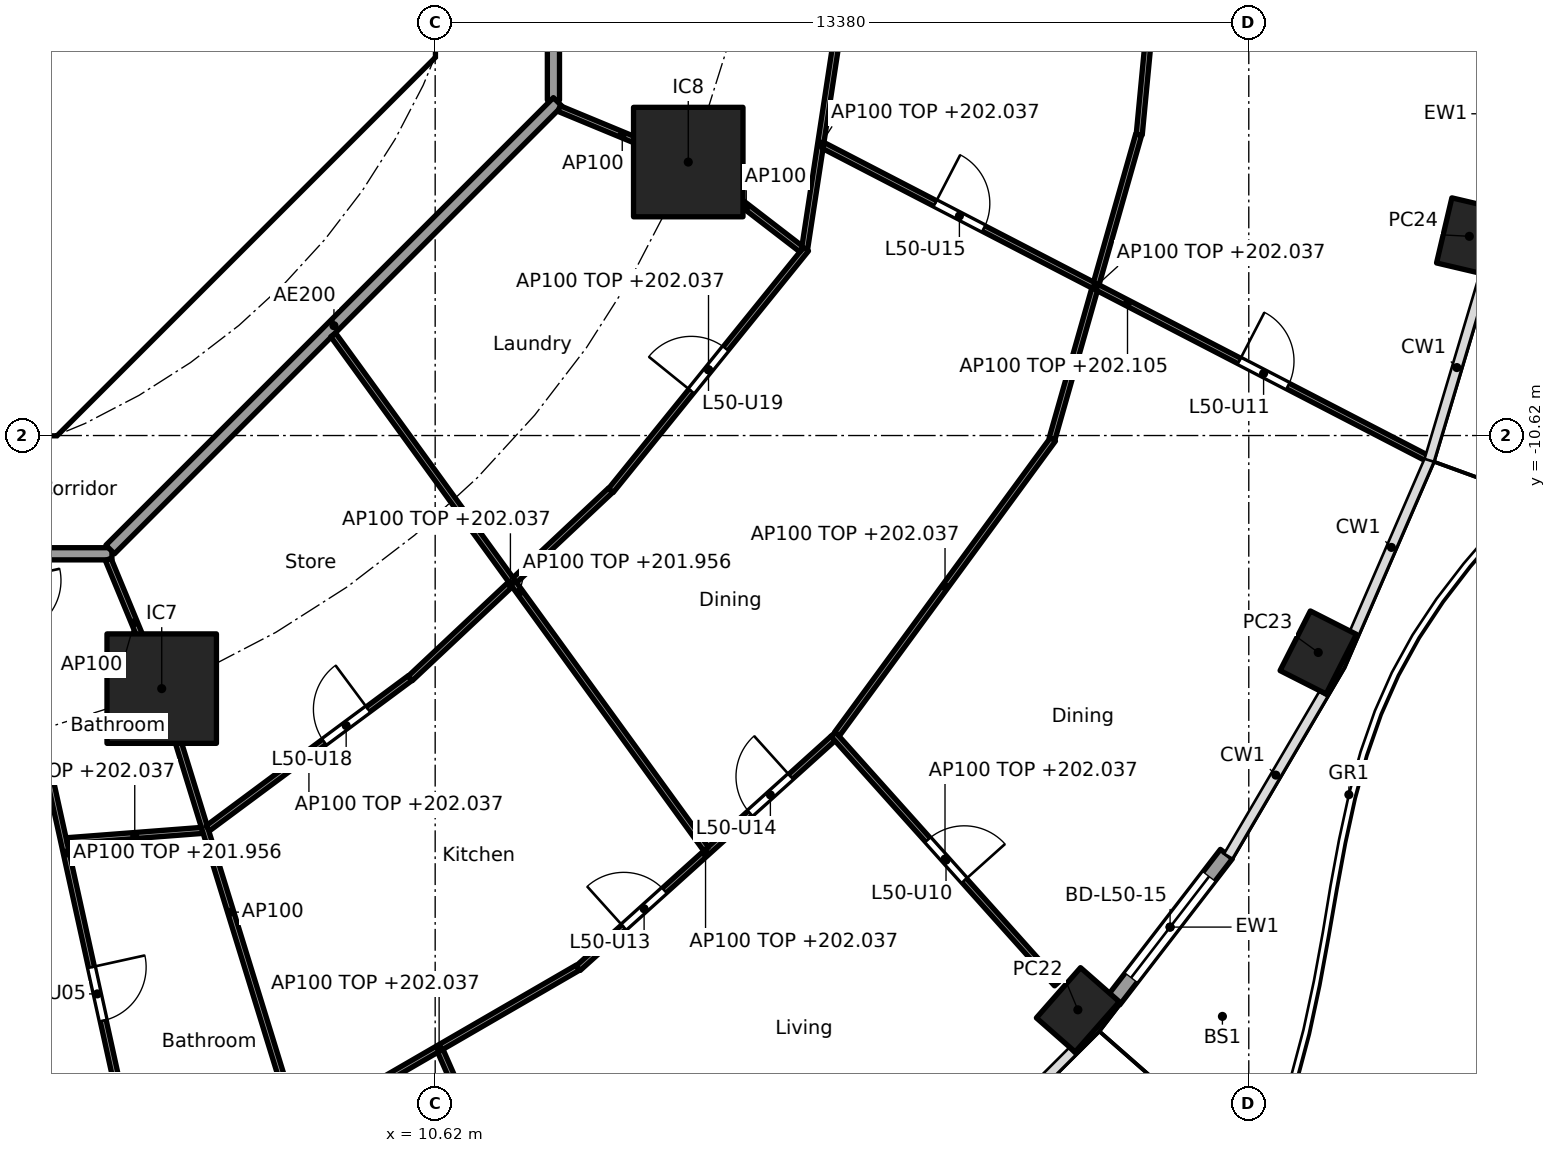
"""IFC4 building model, lengths in metres.
Left out: names, types, materials, properties, quantities, classifications, styles, units other than length and angle.
Written with IfcOpenShell. Run it as: python <this file> out.ifc"""

import sys

from ifc_helpers import new_model, si_unit, direction, frame, frame_2d, origin, origin_2d, place, context, subcontext, project, spatial, polyline, rectangle, hollow_rectangle, outline, extrude, element, fill, save


model = new_model("IFC4")
c1 = context("Model", 3, precision=1e-05, world=origin(), true_north=direction((0.0, 1.0)))
c2 = subcontext(c1, "Body", "Model", "MODEL_VIEW")
j1 = project(units=[si_unit("LENGTHUNIT", "METRE"), si_unit("PLANEANGLEUNIT", "RADIAN")], contexts=[c1])
p1 = place(None, origin())
s1 = spatial("IfcSite", under=j1, at=p1, CompositionType="ELEMENT")
p2 = place(p1, origin())
s2 = spatial("IfcBuilding", under=s1, at=p2, CompositionType="ELEMENT")
p3 = place(p2, frame((0.0, 0.0, 199.2)))
s3 = spatial("IfcBuildingStorey", under=s2, at=p3, CompositionType="ELEMENT", Elevation=199.2)
for number, where, z_axis, x_axis in (
    (1, (21.189, -20.064, 0.0), (0.0, 0.0, 1.0), (0.66, 0.751, 0.0)),
    (2, (25.142, -14.188, 0.0), (0.0, 0.0, 1.0), (0.452, 0.892, 0.0)),
    (3, (27.627, -7.344, 0.0), (0.0, 0.0, 1.0), (0.229, 0.973, 0.0)),
):
    element("IfcColumn", number, at=place(p3, frame(where, z_axis=z_axis, x_axis=x_axis)), inside=s3, PredefinedType="COLUMN", context=c2, shape_type="SweptSolid", body=[
        extrude(hollow_rectangle(XDim=1.1, YDim=0.85, WallThickness=0.036, at=origin_2d()), origin(), (0.0, 0.0, 1.0), 3.7),
    ])
for number, where, z_axis, x_axis in (
    (4, (6.123, -14.782, 0.0), (0.0, 0.0, 1.0), (1.0, 0.0, 0.0)),
    (5, (14.782, -6.123, 0.0), (0.0, 0.0, 1.0), (1.0, 0.0, 0.0)),
):
    element("IfcColumn", number, at=place(p3, frame(where, z_axis=z_axis, x_axis=x_axis)), inside=s3, PredefinedType="COLUMN", context=c2, shape_type="SweptSolid", body=[
        extrude(rectangle(XDim=1.8, YDim=1.8, at=origin_2d()), origin(), (0.0, 0.0, 1.0), 3.7),
    ])
p4 = place(p3, frame((23.632, -17.502, 0.0), z_axis=(0.0, 0.0, 1.0), x_axis=(-0.610437428894, -0.79206448311, 0.0)))
e6 = element("IfcWall", 6, at=p4, inside=s3, PredefinedType="SOLIDWALL", context=c2, shape_type="SweptSolid", body=[
    extrude(rectangle(XDim=3.035, YDim=0.25, at=frame_2d((1.518, 0.0))), origin(), (0.0, 0.0, 1.0), 3.44),
])
p5 = place(p4, frame((0.468, 0.0, 0.0)))
e7 = element("IfcOpeningElement", 7, at=p5, cuts=e6, PredefinedType="OPENING", context=c2, shape_type="SweptSolid", body=[
    extrude(rectangle(XDim=2.1, YDim=2.4, at=frame_2d((1.05, 1.2))), frame((0.0, 0.135, 0.0), z_axis=(0.0, -1.0, 0.0), x_axis=(1.0, 0.0, 0.0)), (0.0, 0.0, 1.0), 0.27),
])
p6 = place(p3, frame((4.613, -9.988, 0.0), z_axis=(0.0, 0.0, 1.0), x_axis=(0.707106781187, 0.707106781187, 0.0)))
e8 = element("IfcWall", 8, at=p6, inside=s3, PredefinedType="SHEAR", context=c2, shape_type="SweptSolid", body=[
    extrude(rectangle(XDim=7.602, YDim=0.6, at=frame_2d((3.801, 0.0))), origin(), (0.0, 0.0, 1.0), 3.44),
])
p7 = place(p6, frame((3.201, 0.0, 0.0)))
e9 = element("IfcOpeningElement", 9, at=p7, cuts=e8, PredefinedType="OPENING", context=c2, shape_type="SweptSolid", body=[
    extrude(rectangle(XDim=1.2, YDim=2.1, at=frame_2d((0.6, 1.05))), frame((0.0, 0.31, 0.0), z_axis=(0.0, -1.0, 0.0), x_axis=(1.0, 0.0, 0.0)), (0.0, 0.0, 1.0), 0.62),
])
p8 = place(p3, origin())
e10 = element("IfcWall", 10, at=p8, inside=s3, PredefinedType="SHEAR", context=c2, shape_type="SweptSolid", body=[
    extrude(outline(polyline([(-4.152, -10.025), (4.152, -10.025), (4.401, -9.776), (4.825, -10.2), (4.401, -10.625), (-4.401, -10.625), (-4.825, -10.2), (-4.401, -9.776), (-4.152, -10.025)])), origin(), (0.0, 0.0, 1.0), 3.44),
])
p9 = place(p3, origin())
e11 = element("IfcWall", 11, at=p9, inside=s3, PredefinedType="SHEAR", context=c2, shape_type="SweptSolid", body=[
    extrude(outline(polyline([(9.776, -4.401), (10.025, -4.152), (10.025, -3.801), (10.025, 4.152), (9.776, 4.401), (10.2, 4.825), (10.625, 4.401), (10.625, -4.401), (10.2, -4.825), (9.776, -4.401)])), origin(), (0.0, 0.0, 1.0), 3.44),
])
p10 = place(p3, frame((12.565, -5.104, 0.0), z_axis=(0.0, 0.0, 1.0), x_axis=(0.0, 1.0, 0.0)))
e12 = element("IfcWall", 12, at=p10, inside=s3, PredefinedType="PARTITIONING", context=c2, shape_type="SweptSolid", body=[
    extrude(rectangle(XDim=10.209, YDim=0.2, at=frame_2d((5.104, 0.0))), origin(), (0.0, 0.0, 1.0), 3.44),
])
p11 = place(p3, frame((-5.104, -12.565, 0.0), z_axis=(0.0, 0.0, 1.0), x_axis=(1.0, 0.0, 0.0)))
e13 = element("IfcWall", 13, at=p11, inside=s3, PredefinedType="PARTITIONING", context=c2, shape_type="SweptSolid", body=[
    extrude(rectangle(XDim=10.409, YDim=0.2, at=frame_2d((5.205, 0.0))), origin(), (0.0, 0.0, 1.0), 3.44),
])
p12 = place(p11, frame((6.339, 0.0, 0.0)))
e14 = element("IfcOpeningElement", 14, at=p12, cuts=e13, PredefinedType="OPENING", context=c2, shape_type="SweptSolid", body=[
    extrude(rectangle(XDim=1.0, YDim=2.1, at=frame_2d((0.5, 1.05))), frame((0.0, 0.11, 0.0), z_axis=(0.0, -1.0, 0.0), x_axis=(1.0, 0.0, 0.0)), (0.0, 0.0, 1.0), 0.22),
])
p13 = place(p3, frame((5.275, -12.494, 0.0), z_axis=(0.0, 0.0, 1.0), x_axis=(0.707106781187, 0.707106781187, 0.0)))
e15 = element("IfcWall", 15, at=p13, inside=s3, PredefinedType="PARTITIONING", context=c2, shape_type="SweptSolid", body=[
    extrude(rectangle(XDim=10.409, YDim=0.2, at=frame_2d((5.205, 0.0))), origin(), (0.0, 0.0, 1.0), 3.44),
])
p14 = place(p3, frame((22.734, -0.05, 0.0), z_axis=(0.0, 0.0, 1.0), x_axis=(-0.0949274088, -0.995484197292, 0.0)))
e16 = element("IfcWall", 16, at=p14, inside=s3, PredefinedType="PARTITIONING", context=c2, shape_type="SweptSolid", body=[
    extrude(rectangle(XDim=5.648, YDim=0.1, at=frame_2d((2.824, 0.0))), origin(), (0.0, 0.0, 1.0), 2.837),
])
p15 = place(p3, frame((3.491, -12.662, 0.0), z_axis=(0.0, 0.0, 1.0), x_axis=(0.215082442833, -0.976595895335, 0.0)))
e17 = element("IfcWall", 17, at=p15, inside=s3, PredefinedType="PARTITIONING", context=c2, shape_type="SweptSolid", body=[
    extrude(rectangle(XDim=9.878, YDim=0.1, at=frame_2d((4.939, 0.0))), origin(), (0.0, 0.0, 1.0), 2.756),
])
p16 = place(p15, frame((0.35, 0.0, 0.0)))
e18 = element("IfcOpeningElement", 18, at=p16, cuts=e17, PredefinedType="OPENING", context=c2, shape_type="SweptSolid", body=[
    extrude(rectangle(XDim=0.9, YDim=2.1, at=frame_2d((0.45, 1.05))), frame((0.0, 0.06, 0.0), z_axis=(0.0, -1.0, 0.0), x_axis=(1.0, 0.0, 0.0)), (0.0, 0.0, 1.0), 0.12),
])
p17 = place(p15, frame((6.861, 0.0, 0.0)))
e19 = element("IfcOpeningElement", 19, at=p17, cuts=e17, PredefinedType="OPENING", context=c2, shape_type="SweptSolid", body=[
    extrude(rectangle(XDim=0.9, YDim=2.1, at=frame_2d((0.45, 1.05))), frame((0.0, 0.06, 0.0), z_axis=(0.0, -1.0, 0.0), x_axis=(1.0, 0.0, 0.0)), (0.0, 0.0, 1.0), 0.12),
])
p18 = place(p3, frame((4.568, -17.284, 0.0), z_axis=(0.0, 0.0, 1.0), x_axis=(0.997076339393, 0.076411867029, 0.0)))
e20 = element("IfcWall", 20, at=p18, inside=s3, PredefinedType="PARTITIONING", context=c2, shape_type="SweptSolid", body=[
    extrude(rectangle(XDim=2.23, YDim=0.1, at=frame_2d((1.115, 0.0))), origin(), (0.0, 0.0, 1.0), 2.837),
])
p19 = place(p3, frame((5.243, -12.657, 0.0), z_axis=(0.0, 0.0, 1.0), x_axis=(0.382719158442, -0.923864733477, 0.0)))
e21 = element("IfcWall", 21, at=p19, inside=s3, PredefinedType="PARTITIONING", context=c2, shape_type="SweptSolid", body=[
    extrude(rectangle(XDim=2.25, YDim=0.1, at=frame_2d((1.125, 0.0))), origin(), (0.0, 0.0, 1.0), 3.44),
])
p20 = place(p3, frame((6.138, -14.83, 0.0), z_axis=(0.0, 0.0, 1.0), x_axis=(0.294822274121, -0.955552105687, 0.0)))
e22 = element("IfcWall", 22, at=p20, inside=s3, PredefinedType="PARTITIONING", context=c2, shape_type="SweptSolid", body=[
    extrude(rectangle(XDim=7.594, YDim=0.1, at=frame_2d((3.797, 0.0))), origin(), (0.0, 0.0, 1.0), 3.44),
])
p21 = place(p3, frame((6.881, -17.08, 0.0), z_axis=(0.0, 0.0, 1.0), x_axis=(0.802784956441, 0.596268659005, 0.0)))
e23 = element("IfcWall", 23, at=p21, inside=s3, PredefinedType="PARTITIONING", context=c2, shape_type="SweptSolid", body=[
    extrude(rectangle(XDim=4.142, YDim=0.1, at=frame_2d((2.071, 0.0))), origin(), (0.0, 0.0, 1.0), 2.837),
])
p22 = place(p21, frame((2.384, 0.0, 0.0)))
e24 = element("IfcOpeningElement", 24, at=p22, cuts=e23, PredefinedType="OPENING", context=c2, shape_type="SweptSolid", body=[
    extrude(rectangle(XDim=0.9, YDim=2.1, at=frame_2d((0.45, 1.05))), frame((0.0, 0.06, 0.0), z_axis=(0.0, -1.0, 0.0), x_axis=(1.0, 0.0, 0.0)), (0.0, 0.0, 1.0), 0.12),
])
p23 = place(p3, frame((8.405, -22.013, 0.0), z_axis=(0.0, 0.0, 1.0), x_axis=(0.865277177388, 0.501293732547, 0.0)))
e25 = element("IfcWall", 25, at=p23, inside=s3, PredefinedType="PARTITIONING", context=c2, shape_type="SweptSolid", body=[
    extrude(rectangle(XDim=5.27, YDim=0.1, at=frame_2d((2.635, 0.0))), origin(), (0.0, 0.0, 1.0), 2.837),
])
p24 = place(p3, frame((10.705, -20.738, 0.0), z_axis=(0.0, 0.0, 1.0), x_axis=(0.401740633891, -0.915753494714, 0.0)))
e26 = element("IfcWall", 26, at=p24, inside=s3, PredefinedType="PARTITIONING", context=c2, shape_type="SweptSolid", body=[
    extrude(rectangle(XDim=6.445, YDim=0.1, at=frame_2d((3.223, 0.0))), origin(), (0.0, 0.0, 1.0), 2.905),
])
p25 = place(p24, frame((2.773, 0.0, 0.0)))
e27 = element("IfcOpeningElement", 27, at=p25, cuts=e26, PredefinedType="OPENING", context=c2, shape_type="SweptSolid", body=[
    extrude(rectangle(XDim=0.9, YDim=2.1, at=frame_2d((0.45, 1.05))), frame((0.0, 0.06, 0.0), z_axis=(0.0, -1.0, 0.0), x_axis=(1.0, 0.0, 0.0)), (0.0, 0.0, 1.0), 0.12),
])
p26 = place(p3, frame((10.21, -14.614, 0.0), z_axis=(0.0, 0.0, 1.0), x_axis=(0.728883199496, 0.684638066055, 0.0)))
e28 = element("IfcWall", 28, at=p26, inside=s3, PredefinedType="PARTITIONING", context=c2, shape_type="SweptSolid", body=[
    extrude(rectangle(XDim=4.519, YDim=0.1, at=frame_2d((2.26, 0.0))), origin(), (0.0, 0.0, 1.0), 2.837),
])
p27 = place(p3, frame((12.971, -19.38, 0.0), z_axis=(0.0, 0.0, 1.0), x_axis=(0.742768881471, 0.669547898748, 0.0)))
e29 = element("IfcWall", 29, at=p27, inside=s3, PredefinedType="PARTITIONING", context=c2, shape_type="SweptSolid", body=[
    extrude(rectangle(XDim=5.642, YDim=0.1, at=frame_2d((2.821, 0.0))), origin(), (0.0, 0.0, 1.0), 2.837),
])
p28 = place(p27, frame((1.01, 0.0, 0.0)))
e30 = element("IfcOpeningElement", 30, at=p28, cuts=e29, PredefinedType="OPENING", context=c2, shape_type="SweptSolid", body=[
    extrude(rectangle(XDim=0.9, YDim=2.1, at=frame_2d((0.45, 1.05))), frame((0.0, 0.06, 0.0), z_axis=(0.0, -1.0, 0.0), x_axis=(1.0, 0.0, 0.0)), (0.0, 0.0, 1.0), 0.12),
])
p29 = place(p27, frame((3.806, 0.0, 0.0)))
e31 = element("IfcOpeningElement", 31, at=p29, cuts=e29, PredefinedType="OPENING", context=c2, shape_type="SweptSolid", body=[
    extrude(rectangle(XDim=0.9, YDim=2.1, at=frame_2d((0.45, 1.05))), frame((0.0, 0.06, 0.0), z_axis=(0.0, -1.0, 0.0), x_axis=(1.0, 0.0, 0.0)), (0.0, 0.0, 1.0), 0.12),
])
p30 = place(p3, frame((8.943, -8.966, 0.0), z_axis=(0.0, 0.0, 1.0), x_axis=(0.587181355751, -0.809455406714, 0.0)))
e32 = element("IfcWall", 32, at=p30, inside=s3, PredefinedType="PARTITIONING", context=c2, shape_type="SweptSolid", body=[
    extrude(rectangle(XDim=10.441, YDim=0.1, at=frame_2d((5.221, 0.0))), origin(), (0.0, 0.0, 1.0), 2.756),
])
p31 = place(p3, frame((13.509, -11.525, 0.0), z_axis=(0.0, 0.0, 1.0), x_axis=(0.628778729481, 0.777584277974, 0.0)))
e33 = element("IfcWall", 33, at=p31, inside=s3, PredefinedType="PARTITIONING", context=c2, shape_type="SweptSolid", body=[
    extrude(rectangle(XDim=5.107, YDim=0.1, at=frame_2d((2.554, 0.0))), origin(), (0.0, 0.0, 1.0), 2.837),
])
p32 = place(p31, frame((2.104, 0.0, 0.0)))
e34 = element("IfcOpeningElement", 34, at=p32, cuts=e33, PredefinedType="OPENING", context=c2, shape_type="SweptSolid", body=[
    extrude(rectangle(XDim=0.9, YDim=2.1, at=frame_2d((0.45, 1.05))), frame((0.0, 0.06, 0.0), z_axis=(0.0, -1.0, 0.0), x_axis=(1.0, 0.0, 0.0)), (0.0, 0.0, 1.0), 0.12),
])
p33 = place(p3, frame((17.166, -15.532, 0.0), z_axis=(0.0, 0.0, 1.0), x_axis=(0.66728415915, -0.744803229684, 0.0)))
e35 = element("IfcWall", 35, at=p33, inside=s3, PredefinedType="PARTITIONING", context=c2, shape_type="SweptSolid", body=[
    extrude(rectangle(XDim=5.511, YDim=0.1, at=frame_2d((2.756, 0.0))), origin(), (0.0, 0.0, 1.0), 2.837),
])
p34 = place(p33, frame((2.331, 0.0, 0.0)))
e36 = element("IfcOpeningElement", 36, at=p34, cuts=e35, PredefinedType="OPENING", context=c2, shape_type="SweptSolid", body=[
    extrude(rectangle(XDim=0.9, YDim=2.1, at=frame_2d((0.45, 1.05))), frame((0.0, 0.06, 0.0), z_axis=(0.0, -1.0, 0.0), x_axis=(1.0, 0.0, 0.0)), (0.0, 0.0, 1.0), 0.12),
])
p35 = place(p3, frame((17.229, -15.529, 0.0), z_axis=(0.0, 0.0, 1.0), x_axis=(0.591117075283, 0.806585769345, 0.0)))
e37 = element("IfcWall", 37, at=p35, inside=s3, PredefinedType="PARTITIONING", context=c2, shape_type="SweptSolid", body=[
    extrude(rectangle(XDim=6.01, YDim=0.1, at=frame_2d((3.005, 0.0))), origin(), (0.0, 0.0, 1.0), 2.837),
])
p36 = place(p3, frame((12.657, -5.243, 0.0), z_axis=(0.0, 0.0, 1.0), x_axis=(0.923826362943, -0.382811769845, 0.0)))
e38 = element("IfcWall", 38, at=p36, inside=s3, PredefinedType="PARTITIONING", context=c2, shape_type="SweptSolid", body=[
    extrude(rectangle(XDim=2.25, YDim=0.1, at=frame_2d((1.125, 0.0))), origin(), (0.0, 0.0, 1.0), 3.44),
])
p37 = place(p3, frame((14.822, -6.154, 0.0), z_axis=(0.0, 0.0, 1.0), x_axis=(0.792226528082, -0.610227111987, 0.0)))
e39 = element("IfcWall", 39, at=p37, inside=s3, PredefinedType="PARTITIONING", context=c2, shape_type="SweptSolid", body=[
    extrude(rectangle(XDim=2.307, YDim=0.1, at=frame_2d((1.154, 0.0))), origin(), (0.0, 0.0, 1.0), 3.44),
])
p38 = place(p3, frame((16.697, -7.543, 0.0), z_axis=(0.0, 0.0, 1.0), x_axis=(0.151078880423, 0.988521710379, 0.0)))
e40 = element("IfcWall", 40, at=p38, inside=s3, PredefinedType="PARTITIONING", context=c2, shape_type="SweptSolid", body=[
    extrude(rectangle(XDim=3.469, YDim=0.1, at=frame_2d((1.735, 0.0))), origin(), (0.0, 0.0, 1.0), 2.837),
])
p39 = place(p3, frame((20.765, -10.673, 0.0), z_axis=(0.0, 0.0, 1.0), x_axis=(0.273815967041, 0.961782104322, 0.0)))
e41 = element("IfcWall", 41, at=p39, inside=s3, PredefinedType="PARTITIONING", context=c2, shape_type="SweptSolid", body=[
    extrude(rectangle(XDim=5.202, YDim=0.1, at=frame_2d((2.601, 0.0))), origin(), (0.0, 0.0, 1.0), 2.837),
])
p40 = place(p3, frame((17.003, -5.851, 0.0), z_axis=(0.0, 0.0, 1.0), x_axis=(0.888005628038, -0.4598325832, 0.0)))
e42 = element("IfcWall", 42, at=p40, inside=s3, PredefinedType="PARTITIONING", context=c2, shape_type="SweptSolid", body=[
    extrude(rectangle(XDim=11.266, YDim=0.1, at=frame_2d((5.633, 0.0))), origin(), (0.0, 0.0, 1.0), 2.905),
])
p41 = place(p40, frame((7.703, 0.0, 0.0)))
e43 = element("IfcOpeningElement", 43, at=p41, cuts=e42, PredefinedType="OPENING", context=c2, shape_type="SweptSolid", body=[
    extrude(rectangle(XDim=0.9, YDim=2.1, at=frame_2d((0.45, 1.05))), frame((0.0, 0.06, 0.0), z_axis=(0.0, -1.0, 0.0), x_axis=(1.0, 0.0, 0.0)), (0.0, 0.0, 1.0), 0.12),
])
p42 = place(p40, frame((2.07, 0.0, 0.0)))
e44 = element("IfcOpeningElement", 44, at=p42, cuts=e42, PredefinedType="OPENING", context=c2, shape_type="SweptSolid", body=[
    extrude(rectangle(XDim=0.9, YDim=2.1, at=frame_2d((0.45, 1.05))), frame((0.0, 0.06, 0.0), z_axis=(0.0, -1.0, 0.0), x_axis=(1.0, 0.0, 0.0)), (0.0, 0.0, 1.0), 0.12),
])
p43 = place(p5, origin())
e45 = element("IfcDoor", 45, at=p43, inside=s3, OperationType="SLIDING_TO_LEFT", PredefinedType="DOOR", context=c2, shape_type="SweptSolid", body=[
    extrude(rectangle(XDim=2.1, YDim=2.4, at=frame_2d((1.05, 1.2))), frame((0.0, 0.025, 0.0), z_axis=(0.0, -1.0, 0.0), x_axis=(1.0, 0.0, 0.0)), (0.0, 0.0, 1.0), 0.05),
])
fill(e7, e45)
p44 = place(p7, origin())
e46 = element("IfcDoor", 46, at=p44, inside=s3, OperationType="SINGLE_SWING_RIGHT", PredefinedType="DOOR", context=c2, shape_type="SweptSolid", body=[
    extrude(rectangle(XDim=1.2, YDim=2.1, at=frame_2d((0.6, 1.05))), frame((0.0, 0.025, 0.0), z_axis=(0.0, -1.0, 0.0), x_axis=(1.0, 0.0, 0.0)), (0.0, 0.0, 1.0), 0.05),
])
fill(e9, e46)
p45 = place(p17, origin())
e47 = element("IfcDoor", 47, at=p45, inside=s3, OperationType="SINGLE_SWING_LEFT", PredefinedType="DOOR", context=c2, shape_type="SweptSolid", body=[
    extrude(rectangle(XDim=0.9, YDim=2.1, at=frame_2d((0.45, 1.05))), frame((0.0, 0.025, 0.0), z_axis=(0.0, -1.0, 0.0), x_axis=(1.0, 0.0, 0.0)), (0.0, 0.0, 1.0), 0.05),
])
fill(e19, e47)
p46 = place(p34, origin())
e48 = element("IfcDoor", 48, at=p46, inside=s3, OperationType="SINGLE_SWING_RIGHT", PredefinedType="DOOR", context=c2, shape_type="SweptSolid", body=[
    extrude(rectangle(XDim=0.9, YDim=2.1, at=frame_2d((0.45, 1.05))), frame((0.0, 0.025, 0.0), z_axis=(0.0, -1.0, 0.0), x_axis=(1.0, 0.0, 0.0)), (0.0, 0.0, 1.0), 0.05),
])
fill(e36, e48)
p47 = place(p41, origin())
e49 = element("IfcDoor", 49, at=p47, inside=s3, OperationType="SINGLE_SWING_LEFT", PredefinedType="DOOR", context=c2, shape_type="SweptSolid", body=[
    extrude(rectangle(XDim=0.9, YDim=2.1, at=frame_2d((0.45, 1.05))), frame((0.0, 0.025, 0.0), z_axis=(0.0, -1.0, 0.0), x_axis=(1.0, 0.0, 0.0)), (0.0, 0.0, 1.0), 0.05),
])
fill(e43, e49)
p48 = place(p28, origin())
e50 = element("IfcDoor", 50, at=p48, inside=s3, OperationType="SINGLE_SWING_LEFT", PredefinedType="DOOR", context=c2, shape_type="SweptSolid", body=[
    extrude(rectangle(XDim=0.9, YDim=2.1, at=frame_2d((0.45, 1.05))), frame((0.0, 0.025, 0.0), z_axis=(0.0, -1.0, 0.0), x_axis=(1.0, 0.0, 0.0)), (0.0, 0.0, 1.0), 0.05),
])
fill(e30, e50)
p49 = place(p29, origin())
e51 = element("IfcDoor", 51, at=p49, inside=s3, OperationType="SINGLE_SWING_RIGHT", PredefinedType="DOOR", context=c2, shape_type="SweptSolid", body=[
    extrude(rectangle(XDim=0.9, YDim=2.1, at=frame_2d((0.45, 1.05))), frame((0.0, 0.025, 0.0), z_axis=(0.0, -1.0, 0.0), x_axis=(1.0, 0.0, 0.0)), (0.0, 0.0, 1.0), 0.05),
])
fill(e31, e51)
p50 = place(p42, origin())
e52 = element("IfcDoor", 52, at=p50, inside=s3, OperationType="SINGLE_SWING_LEFT", PredefinedType="DOOR", context=c2, shape_type="SweptSolid", body=[
    extrude(rectangle(XDim=0.9, YDim=2.1, at=frame_2d((0.45, 1.05))), frame((0.0, 0.025, 0.0), z_axis=(0.0, -1.0, 0.0), x_axis=(1.0, 0.0, 0.0)), (0.0, 0.0, 1.0), 0.05),
])
fill(e44, e52)
p51 = place(p22, origin())
e53 = element("IfcDoor", 53, at=p51, inside=s3, OperationType="SINGLE_SWING_RIGHT", PredefinedType="DOOR", context=c2, shape_type="SweptSolid", body=[
    extrude(rectangle(XDim=0.9, YDim=2.1, at=frame_2d((0.45, 1.05))), frame((0.0, 0.025, 0.0), z_axis=(0.0, -1.0, 0.0), x_axis=(1.0, 0.0, 0.0)), (0.0, 0.0, 1.0), 0.05),
])
fill(e24, e53)
p52 = place(p32, origin())
e54 = element("IfcDoor", 54, at=p52, inside=s3, OperationType="SINGLE_SWING_LEFT", PredefinedType="DOOR", context=c2, shape_type="SweptSolid", body=[
    extrude(rectangle(XDim=0.9, YDim=2.1, at=frame_2d((0.45, 1.05))), frame((0.0, 0.025, 0.0), z_axis=(0.0, -1.0, 0.0), x_axis=(1.0, 0.0, 0.0)), (0.0, 0.0, 1.0), 0.05),
])
fill(e34, e54)
save(model, sys.argv[1])
